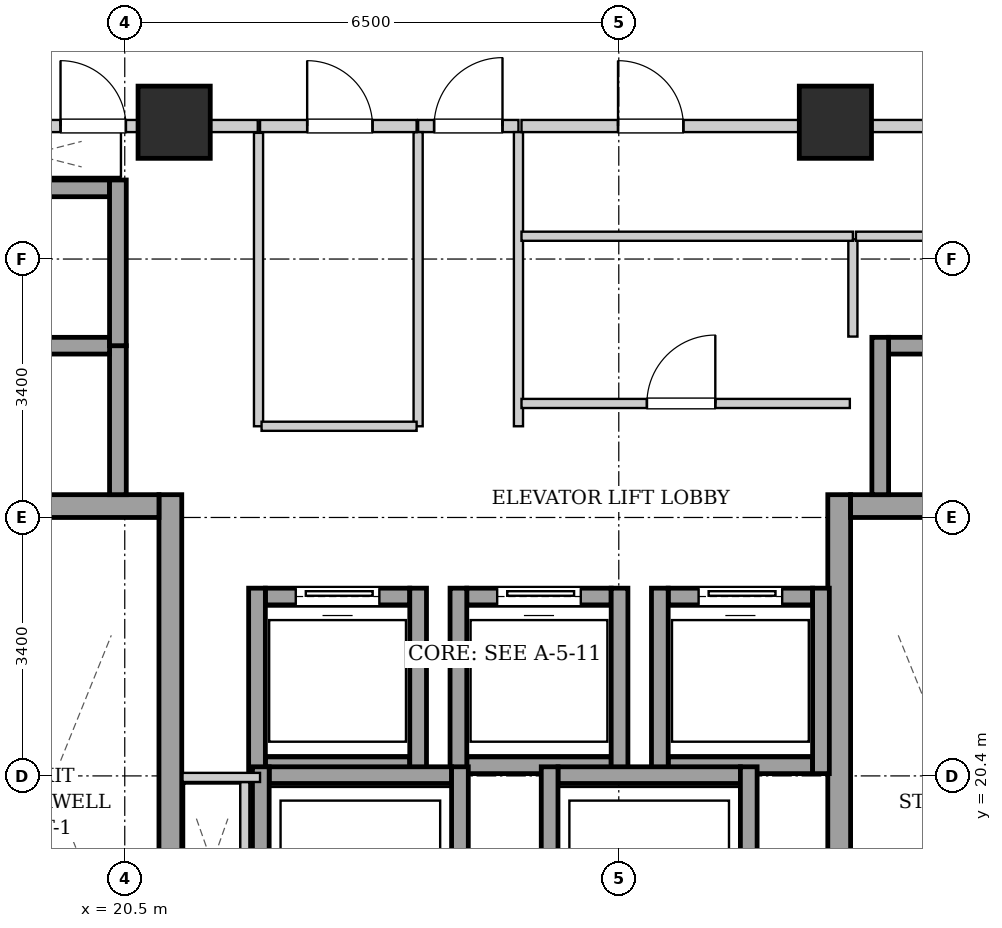
"""IFC4 building model, lengths in metres.
Left out: names, types, materials, properties, quantities, classifications, styles, units other than length and angle.
Written with IfcOpenShell. Run it as: python <this file> out.ifc"""

import sys

from ifc_helpers import new_model, si_unit, direction, frame, frame_2d, origin, origin_2d, place, context, subcontext, project, spatial, rectangle, extrude, element, fill, save


model = new_model("IFC4")
c1 = context("Model", 3, precision=1e-05, world=origin(), true_north=direction((0.0, 1.0)))
c2 = subcontext(c1, "Body", "Model", "MODEL_VIEW")
j1 = project(units=[si_unit("LENGTHUNIT", "METRE"), si_unit("PLANEANGLEUNIT", "RADIAN")], contexts=[c1])
p1 = place(None, origin())
s1 = spatial("IfcSite", under=j1, at=p1, CompositionType="ELEMENT")
p2 = place(p1, origin())
s2 = spatial("IfcBuilding", under=s1, at=p2, CompositionType="ELEMENT")
p3 = place(p2, frame((0.0, 0.0, 140.65)))
s3 = spatial("IfcBuildingStorey", under=s2, at=p3, CompositionType="ELEMENT", Elevation=140.65)
for number, where, z_axis, x_axis in (
    (1, (21.15, 29.0, 0.0), (0.0, 0.0, 1.0), (1.0, 0.0, 0.0)),
    (2, (29.85, 29.0, 0.0), (0.0, 0.0, 1.0), (1.0, 0.0, 0.0)),
):
    element("IfcColumn", number, at=place(p3, frame(where, z_axis=z_axis, x_axis=x_axis)), inside=s3, PredefinedType="COLUMN", context=c2, shape_type="SweptSolid", body=[
        extrude(rectangle(XDim=0.95, YDim=0.95, at=origin_2d()), origin(), (0.0, 0.0, 1.0), 3.25),
    ])
p4 = place(p3, frame((21.1, 15.1, 0.0), z_axis=(0.0, 0.0, 1.0), x_axis=(0.0, 1.0, 0.0)))
e3 = element("IfcWall", 3, at=p4, inside=s3, PredefinedType="SHEAR", context=c2, shape_type="SweptSolid", body=[
    extrude(rectangle(XDim=9.0, YDim=0.3, at=frame_2d((4.5, 0.0))), origin(), (0.0, 0.0, 1.0), 2.99),
])
p5 = place(p3, frame((18.1, 23.95, 0.0), z_axis=(0.0, 0.0, 1.0), x_axis=(1.0, 0.0, 0.0)))
e4 = element("IfcWall", 4, at=p5, inside=s3, PredefinedType="SHEAR", context=c2, shape_type="SweptSolid", body=[
    extrude(rectangle(XDim=2.85, YDim=0.3, at=frame_2d((1.425, 0.0))), origin(), (0.0, 0.0, 1.0), 2.99),
])
p6 = place(p3, frame((29.9, 15.1, 0.0), z_axis=(0.0, 0.0, 1.0), x_axis=(0.0, 1.0, 0.0)))
e5 = element("IfcWall", 5, at=p6, inside=s3, PredefinedType="SHEAR", context=c2, shape_type="SweptSolid", body=[
    extrude(rectangle(XDim=9.0, YDim=0.3, at=frame_2d((4.5, 0.0))), origin(), (0.0, 0.0, 1.0), 2.99),
])
p7 = place(p3, frame((30.05, 23.95, 0.0), z_axis=(0.0, 0.0, 1.0), x_axis=(1.0, 0.0, 0.0)))
e6 = element("IfcWall", 6, at=p7, inside=s3, PredefinedType="SHEAR", context=c2, shape_type="SweptSolid", body=[
    extrude(rectangle(XDim=2.85, YDim=0.3, at=frame_2d((1.425, 0.0))), origin(), (0.0, 0.0, 1.0), 2.99),
])
p8 = place(p3, frame((22.35, 20.54, 0.0), z_axis=(0.0, 0.0, 1.0), x_axis=(1.0, 0.0, 0.0)))
e7 = element("IfcWall", 7, at=p8, inside=s3, PredefinedType="SHEAR", context=c2, shape_type="SweptSolid", body=[
    extrude(rectangle(XDim=1.9, YDim=0.22, at=frame_2d((0.95, 0.0))), origin(), (0.0, 0.0, 1.0), 2.99),
])
p9 = place(p3, frame((22.35, 22.76, 0.0), z_axis=(0.0, 0.0, 1.0), x_axis=(1.0, 0.0, 0.0)))
e8 = element("IfcWall", 8, at=p9, inside=s3, PredefinedType="SHEAR", context=c2, shape_type="SweptSolid", body=[
    extrude(rectangle(XDim=1.9, YDim=0.22, at=frame_2d((0.95, 0.0))), origin(), (0.0, 0.0, 1.0), 2.99),
])
p10 = place(p9, frame((0.4, 0.0, 0.0)))
e9 = element("IfcOpeningElement", 9, at=p10, cuts=e8, PredefinedType="OPENING", context=c2, shape_type="SweptSolid", body=[
    extrude(rectangle(XDim=1.1, YDim=2.15, at=frame_2d((0.55, 1.075))), frame((0.0, 0.12, 0.0), z_axis=(0.0, -1.0, 0.0), x_axis=(1.0, 0.0, 0.0)), (0.0, 0.0, 1.0), 0.24),
])
for number, where, z_axis, x_axis in (
    (10, (22.24, 20.43, 0.0), (0.0, 0.0, 1.0), (0.0, 1.0, 0.0)),
    (11, (24.36, 20.43, 0.0), (0.0, 0.0, 1.0), (0.0, 1.0, 0.0)),
):
    element("IfcWall", number, at=place(p3, frame(where, z_axis=z_axis, x_axis=x_axis)), inside=s3, PredefinedType="SHEAR", context=c2, shape_type="SweptSolid", body=[
        extrude(rectangle(XDim=2.44, YDim=0.22, at=frame_2d((1.22, 0.0))), origin(), (0.0, 0.0, 1.0), 2.99),
    ])
p11 = place(p3, frame((25.0, 20.54, 0.0), z_axis=(0.0, 0.0, 1.0), x_axis=(1.0, 0.0, 0.0)))
e12 = element("IfcWall", 12, at=p11, inside=s3, PredefinedType="SHEAR", context=c2, shape_type="SweptSolid", body=[
    extrude(rectangle(XDim=1.9, YDim=0.22, at=frame_2d((0.95, 0.0))), origin(), (0.0, 0.0, 1.0), 2.99),
])
p12 = place(p3, frame((25.0, 22.76, 0.0), z_axis=(0.0, 0.0, 1.0), x_axis=(1.0, 0.0, 0.0)))
e13 = element("IfcWall", 13, at=p12, inside=s3, PredefinedType="SHEAR", context=c2, shape_type="SweptSolid", body=[
    extrude(rectangle(XDim=1.9, YDim=0.22, at=frame_2d((0.95, 0.0))), origin(), (0.0, 0.0, 1.0), 2.99),
])
p13 = place(p12, frame((0.4, 0.0, 0.0)))
e14 = element("IfcOpeningElement", 14, at=p13, cuts=e13, PredefinedType="OPENING", context=c2, shape_type="SweptSolid", body=[
    extrude(rectangle(XDim=1.1, YDim=2.15, at=frame_2d((0.55, 1.075))), frame((0.0, 0.12, 0.0), z_axis=(0.0, -1.0, 0.0), x_axis=(1.0, 0.0, 0.0)), (0.0, 0.0, 1.0), 0.24),
])
for number, where, z_axis, x_axis in (
    (15, (24.89, 20.43, 0.0), (0.0, 0.0, 1.0), (0.0, 1.0, 0.0)),
    (16, (27.01, 20.43, 0.0), (0.0, 0.0, 1.0), (0.0, 1.0, 0.0)),
):
    element("IfcWall", number, at=place(p3, frame(where, z_axis=z_axis, x_axis=x_axis)), inside=s3, PredefinedType="SHEAR", context=c2, shape_type="SweptSolid", body=[
        extrude(rectangle(XDim=2.44, YDim=0.22, at=frame_2d((1.22, 0.0))), origin(), (0.0, 0.0, 1.0), 2.99),
    ])
p14 = place(p3, frame((27.65, 20.54, 0.0), z_axis=(0.0, 0.0, 1.0), x_axis=(1.0, 0.0, 0.0)))
e17 = element("IfcWall", 17, at=p14, inside=s3, PredefinedType="SHEAR", context=c2, shape_type="SweptSolid", body=[
    extrude(rectangle(XDim=1.9, YDim=0.22, at=frame_2d((0.95, 0.0))), origin(), (0.0, 0.0, 1.0), 2.99),
])
p15 = place(p3, frame((27.65, 22.76, 0.0), z_axis=(0.0, 0.0, 1.0), x_axis=(1.0, 0.0, 0.0)))
e18 = element("IfcWall", 18, at=p15, inside=s3, PredefinedType="SHEAR", context=c2, shape_type="SweptSolid", body=[
    extrude(rectangle(XDim=1.9, YDim=0.22, at=frame_2d((0.95, 0.0))), origin(), (0.0, 0.0, 1.0), 2.99),
])
p16 = place(p15, frame((0.4, 0.0, 0.0)))
e19 = element("IfcOpeningElement", 19, at=p16, cuts=e18, PredefinedType="OPENING", context=c2, shape_type="SweptSolid", body=[
    extrude(rectangle(XDim=1.1, YDim=2.15, at=frame_2d((0.55, 1.075))), frame((0.0, 0.12, 0.0), z_axis=(0.0, -1.0, 0.0), x_axis=(1.0, 0.0, 0.0)), (0.0, 0.0, 1.0), 0.24),
])
for number, where, z_axis, x_axis in (
    (20, (27.54, 20.43, 0.0), (0.0, 0.0, 1.0), (0.0, 1.0, 0.0)),
    (21, (29.66, 20.43, 0.0), (0.0, 0.0, 1.0), (0.0, 1.0, 0.0)),
):
    element("IfcWall", number, at=place(p3, frame(where, z_axis=z_axis, x_axis=x_axis)), inside=s3, PredefinedType="SHEAR", context=c2, shape_type="SweptSolid", body=[
        extrude(rectangle(XDim=2.44, YDim=0.22, at=frame_2d((1.22, 0.0))), origin(), (0.0, 0.0, 1.0), 2.99),
    ])
p17 = place(p3, frame((20.41, 24.1, 0.0), z_axis=(0.0, 0.0, 1.0), x_axis=(0.0, 1.0, 0.0)))
e22 = element("IfcWall", 22, at=p17, inside=s3, PredefinedType="SHEAR", context=c2, shape_type="SweptSolid", body=[
    extrude(rectangle(XDim=1.96, YDim=0.22, at=frame_2d((0.98, 0.0))), origin(), (0.0, 0.0, 1.0), 2.99),
])
for number, where, z_axis, x_axis in (
    (23, (18.4, 26.06, 0.0), (0.0, 0.0, 1.0), (1.0, 0.0, 0.0)),
    (24, (18.4, 28.13, 0.0), (0.0, 0.0, 1.0), (1.0, 0.0, 0.0)),
):
    element("IfcWall", number, at=place(p3, frame(where, z_axis=z_axis, x_axis=x_axis)), inside=s3, PredefinedType="SHEAR", context=c2, shape_type="SweptSolid", body=[
        extrude(rectangle(XDim=1.9, YDim=0.22, at=frame_2d((0.95, 0.0))), origin(), (0.0, 0.0, 1.0), 2.99),
    ])
p18 = place(p3, frame((20.41, 26.06, 0.0), z_axis=(0.0, 0.0, 1.0), x_axis=(0.0, 1.0, 0.0)))
e25 = element("IfcWall", 25, at=p18, inside=s3, PredefinedType="SHEAR", context=c2, shape_type="SweptSolid", body=[
    extrude(rectangle(XDim=2.18, YDim=0.22, at=frame_2d((1.09, 0.0))), origin(), (0.0, 0.0, 1.0), 2.99),
])
p19 = place(p3, frame((30.55, 26.06, 0.0), z_axis=(0.0, 0.0, 1.0), x_axis=(1.0, 0.0, 0.0)))
e26 = element("IfcWall", 26, at=p19, inside=s3, PredefinedType="SHEAR", context=c2, shape_type="SweptSolid", body=[
    extrude(rectangle(XDim=1.9, YDim=0.22, at=frame_2d((0.95, 0.0))), origin(), (0.0, 0.0, 1.0), 2.99),
])
p20 = place(p3, frame((30.44, 24.1, 0.0), z_axis=(0.0, 0.0, 1.0), x_axis=(0.0, 1.0, 0.0)))
e27 = element("IfcWall", 27, at=p20, inside=s3, PredefinedType="SHEAR", context=c2, shape_type="SweptSolid", body=[
    extrude(rectangle(XDim=2.07, YDim=0.22, at=frame_2d((1.035, 0.0))), origin(), (0.0, 0.0, 1.0), 2.99),
])
p21 = place(p3, frame((22.4, 20.41, 0.0), z_axis=(0.0, 0.0, 1.0), x_axis=(1.0, 0.0, 0.0)))
e28 = element("IfcWall", 28, at=p21, inside=s3, PredefinedType="SHEAR", context=c2, shape_type="SweptSolid", body=[
    extrude(rectangle(XDim=2.4, YDim=0.22, at=frame_2d((1.2, 0.0))), origin(), (0.0, 0.0, 1.0), 2.99),
])
for number, where, z_axis, x_axis in (
    (29, (22.29, 17.98, 0.0), (0.0, 0.0, 1.0), (0.0, 1.0, 0.0)),
    (30, (24.91, 17.98, 0.0), (0.0, 0.0, 1.0), (0.0, 1.0, 0.0)),
):
    element("IfcWall", number, at=place(p3, frame(where, z_axis=z_axis, x_axis=x_axis)), inside=s3, PredefinedType="SHEAR", context=c2, shape_type="SweptSolid", body=[
        extrude(rectangle(XDim=2.54, YDim=0.22, at=frame_2d((1.27, 0.0))), origin(), (0.0, 0.0, 1.0), 2.99),
    ])
p22 = place(p3, frame((26.2, 20.41, 0.0), z_axis=(0.0, 0.0, 1.0), x_axis=(1.0, 0.0, 0.0)))
e31 = element("IfcWall", 31, at=p22, inside=s3, PredefinedType="SHEAR", context=c2, shape_type="SweptSolid", body=[
    extrude(rectangle(XDim=2.4, YDim=0.22, at=frame_2d((1.2, 0.0))), origin(), (0.0, 0.0, 1.0), 2.99),
])
for number, where, z_axis, x_axis in (
    (32, (26.09, 17.98, 0.0), (0.0, 0.0, 1.0), (0.0, 1.0, 0.0)),
    (33, (28.71, 17.98, 0.0), (0.0, 0.0, 1.0), (0.0, 1.0, 0.0)),
):
    element("IfcWall", number, at=place(p3, frame(where, z_axis=z_axis, x_axis=x_axis)), inside=s3, PredefinedType="SHEAR", context=c2, shape_type="SweptSolid", body=[
        extrude(rectangle(XDim=2.54, YDim=0.22, at=frame_2d((1.27, 0.0))), origin(), (0.0, 0.0, 1.0), 2.99),
    ])
p23 = place(p3, frame((24.36, 28.95, 0.0), z_axis=(0.0, 0.0, 1.0), x_axis=(1.0, 0.0, 0.0)))
e34 = element("IfcWall", 34, at=p23, inside=s3, PredefinedType="PARTITIONING", context=c2, shape_type="SweptSolid", body=[
    extrude(rectangle(XDim=1.32, YDim=0.16, at=frame_2d((0.66, 0.0))), origin(), (0.0, 0.0, 1.0), 2.426),
])
p24 = place(p23, frame((0.21, 0.0, 0.0)))
e35 = element("IfcOpeningElement", 35, at=p24, cuts=e34, PredefinedType="OPENING", context=c2, shape_type="SweptSolid", body=[
    extrude(rectangle(XDim=0.9, YDim=2.05, at=frame_2d((0.45, 1.025))), frame((0.0, 0.09, 0.0), z_axis=(0.0, -1.0, 0.0), x_axis=(1.0, 0.0, 0.0)), (0.0, 0.0, 1.0), 0.18),
])
p25 = place(p3, frame((17.96, 28.95, 0.0), z_axis=(0.0, 0.0, 1.0), x_axis=(1.0, 0.0, 0.0)))
e36 = element("IfcWall", 36, at=p25, inside=s3, PredefinedType="PARTITIONING", context=c2, shape_type="SweptSolid", body=[
    extrude(rectangle(XDim=4.29, YDim=0.16, at=frame_2d((2.145, 0.0))), origin(), (0.0, 0.0, 1.0), 2.426),
])
p26 = place(p25, frame((1.695, 0.0, 0.0)))
e37 = element("IfcOpeningElement", 37, at=p26, cuts=e36, PredefinedType="OPENING", context=c2, shape_type="SweptSolid", body=[
    extrude(rectangle(XDim=0.86, YDim=2.05, at=frame_2d((0.43, 1.025))), frame((0.0, 0.09, 0.0), z_axis=(0.0, -1.0, 0.0), x_axis=(1.0, 0.0, 0.0)), (0.0, 0.0, 1.0), 0.18),
])
p27 = place(p3, frame((22.08, 18.2, 0.0), z_axis=(0.0, 0.0, 1.0), x_axis=(0.0, 1.0, 0.0)))
e38 = element("IfcWall", 38, at=p27, inside=s3, PredefinedType="PARTITIONING", context=c2, shape_type="SweptSolid", body=[
    extrude(rectangle(XDim=2.12, YDim=0.12, at=frame_2d((1.06, 0.0))), origin(), (0.0, 0.0, 1.0), 2.99),
])
p28 = place(p3, frame((22.28, 20.38, 0.0), z_axis=(0.0, 0.0, 1.0), x_axis=(-1.0, 0.0, 0.0)))
e39 = element("IfcWall", 39, at=p28, inside=s3, PredefinedType="PARTITIONING", context=c2, shape_type="SweptSolid", body=[
    extrude(rectangle(XDim=1.02, YDim=0.12, at=frame_2d((0.51, 0.0))), origin(), (0.0, 0.0, 1.0), 2.99),
])
for number, where, z_axis, x_axis in (
    (40, (24.36, 25.0, 0.0), (0.0, 0.0, 1.0), (0.0, 1.0, 0.0)),
    (41, (25.68, 25.0, 0.0), (0.0, 0.0, 1.0), (0.0, 1.0, 0.0)),
):
    element("IfcWall", number, at=place(p3, frame(where, z_axis=z_axis, x_axis=x_axis)), inside=s3, PredefinedType="PARTITIONING", context=c2, shape_type="SweptSolid", body=[
        extrude(rectangle(XDim=3.87, YDim=0.12, at=frame_2d((1.935, 0.0))), origin(), (0.0, 0.0, 1.0), 2.99),
    ])
p29 = place(p3, frame((30.08, 26.18, 0.0), z_axis=(0.0, 0.0, 1.0), x_axis=(0.0, 1.0, 0.0)))
e42 = element("IfcWall", 42, at=p29, inside=s3, PredefinedType="PARTITIONING", context=c2, shape_type="SweptSolid", body=[
    extrude(rectangle(XDim=1.28, YDim=0.12, at=frame_2d((0.64, 0.0))), origin(), (0.0, 0.0, 1.0), 2.99),
])
p30 = place(p3, frame((30.12, 27.5, 0.0), z_axis=(0.0, 0.0, 1.0), x_axis=(1.0, 0.0, 0.0)))
e43 = element("IfcWall", 43, at=p30, inside=s3, PredefinedType="PARTITIONING", context=c2, shape_type="SweptSolid", body=[
    extrude(rectangle(XDim=2.92, YDim=0.12, at=frame_2d((1.46, 0.0))), origin(), (0.0, 0.0, 1.0), 2.99),
])
p31 = place(p30, frame((0.97, 0.0, 0.0)))
e44 = element("IfcOpeningElement", 44, at=p31, cuts=e43, PredefinedType="OPENING", context=c2, shape_type="SweptSolid", body=[
    extrude(rectangle(XDim=0.86, YDim=2.05, at=frame_2d((0.43, 1.025))), frame((0.0, 0.07, 0.0), z_axis=(0.0, -1.0, 0.0), x_axis=(1.0, 0.0, 0.0)), (0.0, 0.0, 1.0), 0.14),
])
p32 = place(p3, frame((22.26, 25.0, 0.0), z_axis=(0.0, 0.0, 1.0), x_axis=(0.0, 1.0, 0.0)))
e45 = element("IfcWall", 45, at=p32, inside=s3, PredefinedType="PARTITIONING", context=c2, shape_type="SweptSolid", body=[
    extrude(rectangle(XDim=3.86, YDim=0.12, at=frame_2d((1.93, 0.0))), origin(), (0.0, 0.0, 1.0), 2.99),
])
p33 = place(p3, frame((22.3, 25.0, 0.0), z_axis=(0.0, 0.0, 1.0), x_axis=(1.0, 0.0, 0.0)))
e46 = element("IfcWall", 46, at=p33, inside=s3, PredefinedType="PARTITIONING", context=c2, shape_type="SweptSolid", body=[
    extrude(rectangle(XDim=2.04, YDim=0.12, at=frame_2d((1.02, 0.0))), origin(), (0.0, 0.0, 1.0), 2.99),
])
p34 = place(p3, frame((22.28, 28.95, 0.0), z_axis=(0.0, 0.0, 1.0), x_axis=(1.0, 0.0, 0.0)))
e47 = element("IfcWall", 47, at=p34, inside=s3, PredefinedType="PARTITIONING", context=c2, shape_type="SweptSolid", body=[
    extrude(rectangle(XDim=2.06, YDim=0.16, at=frame_2d((1.03, 0.0))), origin(), (0.0, 0.0, 1.0), 2.426),
])
p35 = place(p34, frame((0.62, 0.0, 0.0)))
e48 = element("IfcOpeningElement", 48, at=p35, cuts=e47, PredefinedType="OPENING", context=c2, shape_type="SweptSolid", body=[
    extrude(rectangle(XDim=0.86, YDim=2.05, at=frame_2d((0.43, 1.025))), frame((0.0, 0.09, 0.0), z_axis=(0.0, -1.0, 0.0), x_axis=(1.0, 0.0, 0.0)), (0.0, 0.0, 1.0), 0.18),
])
p36 = place(p3, frame((25.72, 27.5, 0.0), z_axis=(0.0, 0.0, 1.0), x_axis=(1.0, 0.0, 0.0)))
e49 = element("IfcWall", 49, at=p36, inside=s3, PredefinedType="PARTITIONING", context=c2, shape_type="SweptSolid", body=[
    extrude(rectangle(XDim=4.36, YDim=0.12, at=frame_2d((2.18, 0.0))), origin(), (0.0, 0.0, 1.0), 2.99),
])
p37 = place(p3, frame((25.72, 25.3, 0.0), z_axis=(0.0, 0.0, 1.0), x_axis=(1.0, 0.0, 0.0)))
e50 = element("IfcWall", 50, at=p37, inside=s3, PredefinedType="PARTITIONING", context=c2, shape_type="SweptSolid", body=[
    extrude(rectangle(XDim=4.32, YDim=0.12, at=frame_2d((2.16, 0.0))), origin(), (0.0, 0.0, 1.0), 2.99),
])
p38 = place(p37, frame((1.65, 0.0, 0.0)))
e51 = element("IfcOpeningElement", 51, at=p38, cuts=e50, PredefinedType="OPENING", context=c2, shape_type="SweptSolid", body=[
    extrude(rectangle(XDim=0.9, YDim=2.05, at=frame_2d((0.45, 1.025))), frame((0.0, 0.07, 0.0), z_axis=(0.0, -1.0, 0.0), x_axis=(1.0, 0.0, 0.0)), (0.0, 0.0, 1.0), 0.14),
])
p39 = place(p3, frame((25.72, 28.95, 0.0), z_axis=(0.0, 0.0, 1.0), x_axis=(1.0, 0.0, 0.0)))
e52 = element("IfcWall", 52, at=p39, inside=s3, PredefinedType="PARTITIONING", context=c2, shape_type="SweptSolid", body=[
    extrude(rectangle(XDim=7.32, YDim=0.16, at=frame_2d((3.66, 0.0))), origin(), (0.0, 0.0, 1.0), 2.426),
])
p40 = place(p39, frame((1.27, 0.0, 0.0)))
e53 = element("IfcOpeningElement", 53, at=p40, cuts=e52, PredefinedType="OPENING", context=c2, shape_type="SweptSolid", body=[
    extrude(rectangle(XDim=0.86, YDim=2.05, at=frame_2d((0.43, 1.025))), frame((0.0, 0.09, 0.0), z_axis=(0.0, -1.0, 0.0), x_axis=(1.0, 0.0, 0.0)), (0.0, 0.0, 1.0), 0.18),
])
p41 = place(p10, origin())
e54 = element("IfcDoor", 54, at=p41, inside=s3, OperationType="SLIDING_TO_LEFT", PredefinedType="DOOR", context=c2, shape_type="SweptSolid", body=[
    extrude(rectangle(XDim=1.1, YDim=2.15, at=frame_2d((0.55, 1.075))), frame((0.0, 0.025, 0.0), z_axis=(0.0, -1.0, 0.0), x_axis=(1.0, 0.0, 0.0)), (0.0, 0.0, 1.0), 0.05),
])
fill(e9, e54)
p42 = place(p13, origin())
e55 = element("IfcDoor", 55, at=p42, inside=s3, OperationType="SLIDING_TO_LEFT", PredefinedType="DOOR", context=c2, shape_type="SweptSolid", body=[
    extrude(rectangle(XDim=1.1, YDim=2.15, at=frame_2d((0.55, 1.075))), frame((0.0, 0.025, 0.0), z_axis=(0.0, -1.0, 0.0), x_axis=(1.0, 0.0, 0.0)), (0.0, 0.0, 1.0), 0.05),
])
fill(e14, e55)
p43 = place(p16, origin())
e56 = element("IfcDoor", 56, at=p43, inside=s3, OperationType="SLIDING_TO_LEFT", PredefinedType="DOOR", context=c2, shape_type="SweptSolid", body=[
    extrude(rectangle(XDim=1.1, YDim=2.15, at=frame_2d((0.55, 1.075))), frame((0.0, 0.025, 0.0), z_axis=(0.0, -1.0, 0.0), x_axis=(1.0, 0.0, 0.0)), (0.0, 0.0, 1.0), 0.05),
])
fill(e19, e56)
p44 = place(p24, origin())
e57 = element("IfcDoor", 57, at=p44, inside=s3, OperationType="SINGLE_SWING_RIGHT", PredefinedType="DOOR", context=c2, shape_type="SweptSolid", body=[
    extrude(rectangle(XDim=0.9, YDim=2.05, at=frame_2d((0.45, 1.025))), frame((0.0, 0.025, 0.0), z_axis=(0.0, -1.0, 0.0), x_axis=(1.0, 0.0, 0.0)), (0.0, 0.0, 1.0), 0.05),
])
fill(e35, e57)
p45 = place(p26, origin())
e58 = element("IfcDoor", 58, at=p45, inside=s3, OperationType="SINGLE_SWING_LEFT", PredefinedType="DOOR", context=c2, shape_type="SweptSolid", body=[
    extrude(rectangle(XDim=0.86, YDim=2.05, at=frame_2d((0.43, 1.025))), frame((0.0, 0.025, 0.0), z_axis=(0.0, -1.0, 0.0), x_axis=(1.0, 0.0, 0.0)), (0.0, 0.0, 1.0), 0.05),
])
fill(e37, e58)
p46 = place(p35, origin())
e59 = element("IfcDoor", 59, at=p46, inside=s3, OperationType="SINGLE_SWING_LEFT", PredefinedType="DOOR", context=c2, shape_type="SweptSolid", body=[
    extrude(rectangle(XDim=0.86, YDim=2.05, at=frame_2d((0.43, 1.025))), frame((0.0, 0.025, 0.0), z_axis=(0.0, -1.0, 0.0), x_axis=(1.0, 0.0, 0.0)), (0.0, 0.0, 1.0), 0.05),
])
fill(e48, e59)
p47 = place(p38, origin())
e60 = element("IfcDoor", 60, at=p47, inside=s3, OperationType="SINGLE_SWING_RIGHT", PredefinedType="DOOR", context=c2, shape_type="SweptSolid", body=[
    extrude(rectangle(XDim=0.9, YDim=2.05, at=frame_2d((0.45, 1.025))), frame((0.0, 0.025, 0.0), z_axis=(0.0, -1.0, 0.0), x_axis=(1.0, 0.0, 0.0)), (0.0, 0.0, 1.0), 0.05),
])
fill(e51, e60)
p48 = place(p40, origin())
e61 = element("IfcDoor", 61, at=p48, inside=s3, OperationType="SINGLE_SWING_LEFT", PredefinedType="DOOR", context=c2, shape_type="SweptSolid", body=[
    extrude(rectangle(XDim=0.86, YDim=2.05, at=frame_2d((0.43, 1.025))), frame((0.0, 0.025, 0.0), z_axis=(0.0, -1.0, 0.0), x_axis=(1.0, 0.0, 0.0)), (0.0, 0.0, 1.0), 0.05),
])
fill(e53, e61)
save(model, sys.argv[1])
